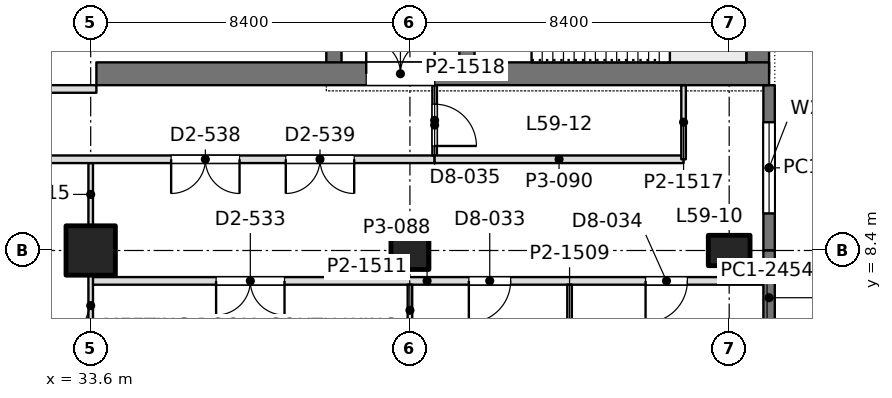
"""IFC4 building model, lengths in metres.
Left out: names, types, materials, properties, quantities, classifications, styles, units other than length and angle.
Written with IfcOpenShell. Run it as: python <this file> out.ifc"""

import sys

from ifc_helpers import new_model, si_unit, direction, frame, frame_2d, origin, origin_2d, place, context, subcontext, project, spatial, rectangle, extrude, element, fill, save


model = new_model("IFC4")
c1 = context("Model", 3, precision=1e-05, world=origin(), true_north=direction((0.0, 1.0)))
c2 = subcontext(c1, "Body", "Model", "MODEL_VIEW")
j1 = project(units=[si_unit("LENGTHUNIT", "METRE"), si_unit("PLANEANGLEUNIT", "RADIAN")], contexts=[c1])
p1 = place(None, origin())
s1 = spatial("IfcSite", under=j1, at=p1, CompositionType="ELEMENT")
p2 = place(p1, origin())
s2 = spatial("IfcBuilding", under=s1, at=p2, CompositionType="ELEMENT")
p3 = place(p2, frame((0.0, 0.0, 259.2)))
s3 = spatial("IfcBuildingStorey", under=s2, at=p3, CompositionType="ELEMENT", Elevation=259.2)
p4 = place(p3, frame((33.6, 8.4, 0.0), z_axis=(0.0, 0.0, 1.0), x_axis=(1.0, 0.0, 0.0)))
e1 = element("IfcColumn", 1, at=p4, inside=s3, PredefinedType="COLUMN", context=c2, shape_type="SweptSolid", body=[
    extrude(rectangle(XDim=1.3, YDim=1.3, at=origin_2d()), origin(), (0.0, 0.0, 1.0), 4.5),
])
p5 = place(p3, frame((42.0, 8.4, 0.0), z_axis=(0.0, 0.0, 1.0), x_axis=(1.0, 0.0, 0.0)))
e2 = element("IfcColumn", 2, at=p5, inside=s3, PredefinedType="COLUMN", context=c2, shape_type="SweptSolid", body=[
    extrude(rectangle(XDim=1.0, YDim=1.0, at=origin_2d()), origin(), (0.0, 0.0, 1.0), 4.5),
])
p6 = place(p3, frame((50.4, 8.4, 0.0), z_axis=(0.0, 0.0, 1.0), x_axis=(0.0, 1.0, 0.0)))
e3 = element("IfcColumn", 3, at=p6, inside=s3, PredefinedType="COLUMN", context=c2, shape_type="SweptSolid", body=[
    extrude(rectangle(XDim=0.8, YDim=1.1, at=origin_2d()), origin(), (0.0, 0.0, 1.0), 4.5),
])
p7 = place(p3, frame((33.75, 13.05, 0.0), z_axis=(0.0, 0.0, 1.0), x_axis=(1.0, 0.0, 0.0)))
e4 = element("IfcWall", 4, at=p7, inside=s3, PredefinedType="SHEAR", context=c2, shape_type="SweptSolid", body=[
    extrude(rectangle(XDim=17.7, YDim=0.6, at=frame_2d((8.85, 0.0))), origin(), (0.0, 0.0, 1.0), 4.5),
])
p8 = place(p7, frame((7.1, 0.0, 0.0)))
e5 = element("IfcOpeningElement", 5, at=p8, cuts=e4, PredefinedType="OPENING", context=c2, shape_type="SweptSolid", body=[
    extrude(rectangle(XDim=1.8, YDim=2.4, at=frame_2d((0.9, 1.2))), frame((0.0, 0.31, 0.0), z_axis=(0.0, -1.0, 0.0), x_axis=(1.0, 0.0, 0.0)), (0.0, 0.0, 1.0), 0.62),
])
p9 = place(p3, frame((51.15, 13.05, 0.0), z_axis=(0.0, 0.0, 1.0), x_axis=(0.0, 1.0, 0.0)))
e6 = element("IfcWall", 6, at=p9, inside=s3, PredefinedType="SHEAR", context=c2, shape_type="SweptSolid", body=[
    extrude(rectangle(XDim=24.3, YDim=0.6, at=frame_2d((12.15, 0.0))), origin(), (0.0, 0.0, 1.0), 4.5),
])
p10 = place(p3, frame((43.5, 13.05, 0.0), z_axis=(0.0, 0.0, 1.0), x_axis=(0.0, 1.0, 0.0)))
e7 = element("IfcWall", 7, at=p10, inside=s3, PredefinedType="SHEAR", context=c2, shape_type="SweptSolid", body=[
    extrude(rectangle(XDim=24.3, YDim=0.4, at=frame_2d((12.15, 0.0))), origin(), (0.0, 0.0, 1.0), 4.5),
])
p11 = place(p10, frame((1.3, 0.0, 0.0)))
e8 = element("IfcOpeningElement", 8, at=p11, cuts=e7, PredefinedType="OPENING", context=c2, shape_type="SweptSolid", body=[
    extrude(rectangle(XDim=1.0, YDim=2.2, at=frame_2d((0.5, 1.1))), frame((0.0, 0.21, 0.0), z_axis=(0.0, -1.0, 0.0), x_axis=(1.0, 0.0, 0.0)), (0.0, 0.0, 1.0), 0.42),
])
p12 = place(p10, frame((22.0, 0.0, 0.0)))
e9 = element("IfcOpeningElement", 9, at=p12, cuts=e7, PredefinedType="OPENING", context=c2, shape_type="SweptSolid", body=[
    extrude(rectangle(XDim=1.0, YDim=2.2, at=frame_2d((0.5, 1.1))), frame((0.0, 0.21, 0.0), z_axis=(0.0, -1.0, 0.0), x_axis=(1.0, 0.0, 0.0)), (0.0, 0.0, 1.0), 0.42),
])
p13 = place(p10, frame((5.55, 0.0, 0.0)))
e10 = element("IfcOpeningElement", 10, at=p13, cuts=e7, PredefinedType="OPENING", context=c2, shape_type="SweptSolid", body=[
    extrude(rectangle(XDim=1.0, YDim=2.2, at=frame_2d((0.5, 1.1))), frame((0.0, 0.21, 0.0), z_axis=(0.0, -1.0, 0.0), x_axis=(1.0, 0.0, 0.0)), (0.0, 0.0, 1.0), 0.42),
])
p14 = place(p10, frame((9.55, 0.0, 0.0)))
e11 = element("IfcOpeningElement", 11, at=p14, cuts=e7, PredefinedType="OPENING", context=c2, shape_type="SweptSolid", body=[
    extrude(rectangle(XDim=1.0, YDim=2.2, at=frame_2d((0.5, 1.1))), frame((0.0, 0.21, 0.0), z_axis=(0.0, -1.0, 0.0), x_axis=(1.0, 0.0, 0.0)), (0.0, 0.0, 1.0), 0.42),
])
p15 = place(p10, frame((12.8, 0.0, 0.0)))
e12 = element("IfcOpeningElement", 12, at=p15, cuts=e7, PredefinedType="OPENING", context=c2, shape_type="SweptSolid", body=[
    extrude(rectangle(XDim=1.1, YDim=2.2, at=frame_2d((0.55, 1.1))), frame((0.0, 0.21, 0.0), z_axis=(0.0, -1.0, 0.0), x_axis=(1.0, 0.0, 0.0)), (0.0, 0.0, 1.0), 0.42),
])
p16 = place(p10, frame((15.538, 0.0, 0.0)))
e13 = element("IfcOpeningElement", 13, at=p16, cuts=e7, PredefinedType="OPENING", context=c2, shape_type="SweptSolid", body=[
    extrude(rectangle(XDim=1.1, YDim=2.2, at=frame_2d((0.55, 1.1))), frame((0.0, 0.21, 0.0), z_axis=(0.0, -1.0, 0.0), x_axis=(1.0, 0.0, 0.0)), (0.0, 0.0, 1.0), 0.42),
])
p17 = place(p10, frame((18.262, 0.0, 0.0)))
e14 = element("IfcOpeningElement", 14, at=p17, cuts=e7, PredefinedType="OPENING", context=c2, shape_type="SweptSolid", body=[
    extrude(rectangle(XDim=1.1, YDim=2.2, at=frame_2d((0.55, 1.1))), frame((0.0, 0.21, 0.0), z_axis=(0.0, -1.0, 0.0), x_axis=(1.0, 0.0, 0.0)), (0.0, 0.0, 1.0), 0.42),
])
p18 = place(p3, frame((40.0, 13.05, 0.0), z_axis=(0.0, 0.0, 1.0), x_axis=(0.0, 1.0, 0.0)))
e15 = element("IfcWall", 15, at=p18, inside=s3, PredefinedType="SHEAR", context=c2, shape_type="SweptSolid", body=[
    extrude(rectangle(XDim=24.3, YDim=0.4, at=frame_2d((12.15, 0.0))), origin(), (0.0, 0.0, 1.0), 4.5),
])
p19 = place(p18, frame((15.75, 0.0, 0.0)))
e16 = element("IfcOpeningElement", 16, at=p19, cuts=e15, PredefinedType="OPENING", context=c2, shape_type="SweptSolid", body=[
    extrude(rectangle(XDim=1.1, YDim=2.2, at=frame_2d((0.55, 1.1))), frame((0.0, 0.21, 0.0), z_axis=(0.0, -1.0, 0.0), x_axis=(1.0, 0.0, 0.0)), (0.0, 0.0, 1.0), 0.42),
])
p20 = place(p18, frame((18.6, 0.0, 0.0)))
e17 = element("IfcOpeningElement", 17, at=p20, cuts=e15, PredefinedType="OPENING", context=c2, shape_type="SweptSolid", body=[
    extrude(rectangle(XDim=1.1, YDim=2.2, at=frame_2d((0.55, 1.1))), frame((0.0, 0.21, 0.0), z_axis=(0.0, -1.0, 0.0), x_axis=(1.0, 0.0, 0.0)), (0.0, 0.0, 1.0), 0.42),
])
p21 = place(p18, frame((21.45, 0.0, 0.0)))
e18 = element("IfcOpeningElement", 18, at=p21, cuts=e15, PredefinedType="OPENING", context=c2, shape_type="SweptSolid", body=[
    extrude(rectangle(XDim=1.1, YDim=2.2, at=frame_2d((0.55, 1.1))), frame((0.0, 0.21, 0.0), z_axis=(0.0, -1.0, 0.0), x_axis=(1.0, 0.0, 0.0)), (0.0, 0.0, 1.0), 0.42),
])
p22 = place(p18, frame((8.65, 0.0, 0.0)))
e19 = element("IfcOpeningElement", 19, at=p22, cuts=e15, PredefinedType="OPENING", context=c2, shape_type="SweptSolid", body=[
    extrude(rectangle(XDim=1.8, YDim=2.4, at=frame_2d((0.9, 1.2))), frame((0.0, 0.21, 0.0), z_axis=(0.0, -1.0, 0.0), x_axis=(1.0, 0.0, 0.0)), (0.0, 0.0, 1.0), 0.42),
])
p23 = place(p3, frame((51.45, 12.75, 0.0), z_axis=(0.0, 0.0, 1.0), x_axis=(0.0, -1.0, 0.0)))
e20 = element("IfcWall", 20, at=p23, inside=s3, PredefinedType="SOLIDWALL", context=c2, shape_type="SweptSolid", body=[
    extrude(rectangle(XDim=4.35, YDim=0.3, at=frame_2d((2.175, 0.0))), origin(), (0.0, 0.0, 1.0), 4.35),
])
p24 = place(p23, frame((0.975, 0.0, 0.9)))
e21 = element("IfcOpeningElement", 21, at=p24, cuts=e20, PredefinedType="OPENING", context=c2, shape_type="SweptSolid", body=[
    extrude(rectangle(XDim=2.4, YDim=1.9, at=frame_2d((1.2, 0.95))), frame((0.0, 0.16, 0.0), z_axis=(0.0, -1.0, 0.0), x_axis=(1.0, 0.0, 0.0)), (0.0, 0.0, 1.0), 0.32),
])
p25 = place(p3, frame((51.45, 8.4, 0.0), z_axis=(0.0, 0.0, 1.0), x_axis=(0.0, -1.0, 0.0)))
e22 = element("IfcWall", 22, at=p25, inside=s3, PredefinedType="SOLIDWALL", context=c2, shape_type="SweptSolid", body=[
    extrude(rectangle(XDim=2.485, YDim=0.3, at=frame_2d((1.243, 0.0))), origin(), (0.0, 0.0, 1.0), 4.35),
])
p26 = place(p3, frame((33.6, 7.6, 0.0), z_axis=(0.0, 0.0, 1.0), x_axis=(1.0, 0.0, 0.0)))
e23 = element("IfcWall", 23, at=p26, inside=s3, PredefinedType="PARTITIONING", context=c2, shape_type="SweptSolid", body=[
    extrude(rectangle(XDim=17.702, YDim=0.2, at=frame_2d((8.851, 0.0))), origin(), (0.0, 0.0, 1.0), 3.86),
])
p27 = place(p26, frame((3.3, 0.0, 0.0)))
e24 = element("IfcOpeningElement", 24, at=p27, cuts=e23, PredefinedType="OPENING", context=c2, shape_type="SweptSolid", body=[
    extrude(rectangle(XDim=1.8, YDim=2.2, at=frame_2d((0.9, 1.1))), frame((0.0, 0.11, 0.0), z_axis=(0.0, -1.0, 0.0), x_axis=(1.0, 0.0, 0.0)), (0.0, 0.0, 1.0), 0.22),
])
p28 = place(p26, frame((9.95, 0.0, 0.0)))
e25 = element("IfcOpeningElement", 25, at=p28, cuts=e23, PredefinedType="OPENING", context=c2, shape_type="SweptSolid", body=[
    extrude(rectangle(XDim=1.1, YDim=2.4, at=frame_2d((0.55, 1.2))), frame((0.0, 0.11, 0.0), z_axis=(0.0, -1.0, 0.0), x_axis=(1.0, 0.0, 0.0)), (0.0, 0.0, 1.0), 0.22),
])
p29 = place(p26, frame((14.6, 0.0, 0.0)))
e26 = element("IfcOpeningElement", 26, at=p29, cuts=e23, PredefinedType="OPENING", context=c2, shape_type="SweptSolid", body=[
    extrude(rectangle(XDim=1.1, YDim=2.4, at=frame_2d((0.55, 1.2))), frame((0.0, 0.11, 0.0), z_axis=(0.0, -1.0, 0.0), x_axis=(1.0, 0.0, 0.0)), (0.0, 0.0, 1.0), 0.22),
])
p30 = place(p3, frame((33.6, 6.149, 0.0), z_axis=(0.0, 0.0, 1.0), x_axis=(0.0, 1.0, 0.0)))
e27 = element("IfcWall", 27, at=p30, inside=s3, PredefinedType="PARTITIONING", context=c2, shape_type="SweptSolid", body=[
    extrude(rectangle(XDim=1.603, YDim=0.12, at=frame_2d((0.802, 0.0))), origin(), (0.0, 0.0, 1.0), 3.99),
])
p31 = place(p3, frame((42.0, 6.149, 0.0), z_axis=(0.0, 0.0, 1.0), x_axis=(0.0, 1.0, 0.0)))
e28 = element("IfcWall", 28, at=p31, inside=s3, PredefinedType="PARTITIONING", context=c2, shape_type="SweptSolid", body=[
    extrude(rectangle(XDim=1.353, YDim=0.12, at=frame_2d((0.677, 0.0))), origin(), (0.0, 0.0, 1.0), 3.99),
])
p32 = place(p3, frame((46.2, 4.7, 0.0), z_axis=(0.0, 0.0, 1.0), x_axis=(0.0, 1.0, 0.0)))
e29 = element("IfcWall", 29, at=p32, inside=s3, PredefinedType="PARTITIONING", context=c2, shape_type="SweptSolid", body=[
    extrude(rectangle(XDim=2.802, YDim=0.12, at=frame_2d((1.401, 0.0))), origin(), (0.0, 0.0, 1.0), 3.86),
])
p33 = place(p3, frame((33.6, 9.049, 0.0), z_axis=(0.0, 0.0, 1.0), x_axis=(0.0, 1.0, 0.0)))
e30 = element("IfcWall", 30, at=p33, inside=s3, PredefinedType="PARTITIONING", context=c2, shape_type="SweptSolid", body=[
    extrude(rectangle(XDim=1.653, YDim=0.12, at=frame_2d((0.826, 0.0))), origin(), (0.0, 0.0, 1.0), 3.99),
])
p34 = place(p3, frame((1.2, 10.8, 0.0), z_axis=(0.0, 0.0, 1.0), x_axis=(1.0, 0.0, 0.0)))
e31 = element("IfcWall", 31, at=p34, inside=s3, PredefinedType="PARTITIONING", context=c2, shape_type="SweptSolid", body=[
    extrude(rectangle(XDim=41.452, YDim=0.2, at=frame_2d((20.726, 0.0))), origin(), (0.0, 0.0, 1.0), 3.8),
])
p35 = place(p34, frame((4.3, 0.0, 0.0)))
e32 = element("IfcOpeningElement", 32, at=p35, cuts=e31, PredefinedType="OPENING", context=c2, shape_type="SweptSolid", body=[
    extrude(rectangle(XDim=1.8, YDim=2.2, at=frame_2d((0.9, 1.1))), frame((0.0, 0.11, 0.0), z_axis=(0.0, -1.0, 0.0), x_axis=(1.0, 0.0, 0.0)), (0.0, 0.0, 1.0), 0.22),
])
p36 = place(p34, frame((9.5, 0.0, 0.0)))
e33 = element("IfcOpeningElement", 33, at=p36, cuts=e31, PredefinedType="OPENING", context=c2, shape_type="SweptSolid", body=[
    extrude(rectangle(XDim=1.8, YDim=2.2, at=frame_2d((0.9, 1.1))), frame((0.0, 0.11, 0.0), z_axis=(0.0, -1.0, 0.0), x_axis=(1.0, 0.0, 0.0)), (0.0, 0.0, 1.0), 0.22),
])
p37 = place(p34, frame((20.3, 0.0, 0.0)))
e34 = element("IfcOpeningElement", 34, at=p37, cuts=e31, PredefinedType="OPENING", context=c2, shape_type="SweptSolid", body=[
    extrude(rectangle(XDim=1.8, YDim=2.2, at=frame_2d((0.9, 1.1))), frame((0.0, 0.11, 0.0), z_axis=(0.0, -1.0, 0.0), x_axis=(1.0, 0.0, 0.0)), (0.0, 0.0, 1.0), 0.22),
])
p38 = place(p34, frame((25.9, 0.0, 0.0)))
e35 = element("IfcOpeningElement", 35, at=p38, cuts=e31, PredefinedType="OPENING", context=c2, shape_type="SweptSolid", body=[
    extrude(rectangle(XDim=1.8, YDim=2.2, at=frame_2d((0.9, 1.1))), frame((0.0, 0.11, 0.0), z_axis=(0.0, -1.0, 0.0), x_axis=(1.0, 0.0, 0.0)), (0.0, 0.0, 1.0), 0.22),
])
p39 = place(p34, frame((34.517, 0.0, 0.0)))
e36 = element("IfcOpeningElement", 36, at=p39, cuts=e31, PredefinedType="OPENING", context=c2, shape_type="SweptSolid", body=[
    extrude(rectangle(XDim=1.8, YDim=2.2, at=frame_2d((0.9, 1.1))), frame((0.0, 0.11, 0.0), z_axis=(0.0, -1.0, 0.0), x_axis=(1.0, 0.0, 0.0)), (0.0, 0.0, 1.0), 0.22),
])
p40 = place(p34, frame((37.533, 0.0, 0.0)))
e37 = element("IfcOpeningElement", 37, at=p40, cuts=e31, PredefinedType="OPENING", context=c2, shape_type="SweptSolid", body=[
    extrude(rectangle(XDim=1.8, YDim=2.2, at=frame_2d((0.9, 1.1))), frame((0.0, 0.11, 0.0), z_axis=(0.0, -1.0, 0.0), x_axis=(1.0, 0.0, 0.0)), (0.0, 0.0, 1.0), 0.22),
])
p41 = place(p3, frame((42.65, 10.898, 0.0), z_axis=(0.0, 0.0, 1.0), x_axis=(0.0, 1.0, 0.0)))
e38 = element("IfcWall", 38, at=p41, inside=s3, PredefinedType="PARTITIONING", context=c2, shape_type="SweptSolid", body=[
    extrude(rectangle(XDim=1.854, YDim=0.12, at=frame_2d((0.927, 0.0))), origin(), (0.0, 0.0, 1.0), 4.35),
])
p42 = place(p41, frame((0.252, 0.0, 0.0)))
e39 = element("IfcOpeningElement", 39, at=p42, cuts=e38, PredefinedType="OPENING", context=c2, shape_type="SweptSolid", body=[
    extrude(rectangle(XDim=1.1, YDim=2.4, at=frame_2d((0.55, 1.2))), frame((0.0, 0.07, 0.0), z_axis=(0.0, -1.0, 0.0), x_axis=(1.0, 0.0, 0.0)), (0.0, 0.0, 1.0), 0.14),
])
p43 = place(p3, frame((42.648, 10.8, 0.0), z_axis=(0.0, 0.0, 1.0), x_axis=(1.0, 0.0, 0.0)))
e40 = element("IfcWall", 40, at=p43, inside=s3, PredefinedType="PARTITIONING", context=c2, shape_type="SweptSolid", body=[
    extrude(rectangle(XDim=6.552, YDim=0.2, at=frame_2d((3.276, 0.0))), origin(), (0.0, 0.0, 1.0), 4.35),
])
p44 = place(p3, frame((49.2, 10.8, 0.0), z_axis=(0.0, 0.0, 1.0), x_axis=(0.0, 1.0, 0.0)))
e41 = element("IfcWall", 41, at=p44, inside=s3, PredefinedType="PARTITIONING", context=c2, shape_type="SweptSolid", body=[
    extrude(rectangle(XDim=1.952, YDim=0.12, at=frame_2d((0.976, 0.0))), origin(), (0.0, 0.0, 1.0), 4.35),
])
p45 = place(p3, frame((16.65, 12.65, 0.0), z_axis=(0.0, 0.0, 1.0), x_axis=(1.0, 0.0, 0.0)))
e42 = element("IfcWall", 42, at=p45, inside=s3, PredefinedType="PARTITIONING", context=c2, shape_type="SweptSolid", body=[
    extrude(rectangle(XDim=17.1, YDim=0.2, at=frame_2d((8.55, 0.0))), origin(), (0.0, 0.0, 1.0), 3.8),
])
p46 = place(p45, frame((3.8, 0.0, 0.0)))
e43 = element("IfcOpeningElement", 43, at=p46, cuts=e42, PredefinedType="OPENING", context=c2, shape_type="SweptSolid", body=[
    extrude(rectangle(XDim=1.1, YDim=2.4, at=frame_2d((0.55, 1.2))), frame((0.0, 0.11, 0.0), z_axis=(0.0, -1.0, 0.0), x_axis=(1.0, 0.0, 0.0)), (0.0, 0.0, 1.0), 0.22),
])
p47 = place(p45, frame((12.2, 0.0, 0.0)))
e44 = element("IfcOpeningElement", 44, at=p47, cuts=e42, PredefinedType="OPENING", context=c2, shape_type="SweptSolid", body=[
    extrude(rectangle(XDim=1.1, YDim=2.4, at=frame_2d((0.55, 1.2))), frame((0.0, 0.11, 0.0), z_axis=(0.0, -1.0, 0.0), x_axis=(1.0, 0.0, 0.0)), (0.0, 0.0, 1.0), 0.22),
])
p48 = place(p24, origin())
e45 = element("IfcWindow", 45, at=p48, inside=s3, PartitioningType="SINGLE_PANEL", PredefinedType="WINDOW", context=c2, shape_type="SweptSolid", body=[
    extrude(rectangle(XDim=2.4, YDim=1.9, at=frame_2d((1.2, 0.95))), frame((0.0, 0.03, 0.0), z_axis=(0.0, -1.0, 0.0), x_axis=(1.0, 0.0, 0.0)), (0.0, 0.0, 1.0), 0.06),
])
fill(e21, e45)
p49 = place(p8, origin())
e46 = element("IfcDoor", 46, at=p49, inside=s3, OperationType="DOUBLE_DOOR_SINGLE_SWING", PredefinedType="DOOR", context=c2, shape_type="SweptSolid", body=[
    extrude(rectangle(XDim=1.8, YDim=2.4, at=frame_2d((0.9, 1.2))), frame((0.0, 0.025, 0.0), z_axis=(0.0, -1.0, 0.0), x_axis=(1.0, 0.0, 0.0)), (0.0, 0.0, 1.0), 0.05),
])
fill(e5, e46)
p50 = place(p27, frame((1.8, 0.0, 0.0), z_axis=(0.0, 0.0, 1.0), x_axis=(-1.0, 0.0, 0.0)))
e47 = element("IfcDoor", 47, at=p50, inside=s3, OperationType="DOUBLE_DOOR_SINGLE_SWING", PredefinedType="DOOR", context=c2, shape_type="SweptSolid", body=[
    extrude(rectangle(XDim=1.8, YDim=2.2, at=frame_2d((0.9, 1.1))), frame((0.0, 0.025, 0.0), z_axis=(0.0, -1.0, 0.0), x_axis=(1.0, 0.0, 0.0)), (0.0, 0.0, 1.0), 0.05),
])
fill(e24, e47)
p51 = place(p28, frame((1.1, 0.0, 0.0), z_axis=(0.0, 0.0, 1.0), x_axis=(-1.0, 0.0, 0.0)))
e48 = element("IfcDoor", 48, at=p51, inside=s3, OperationType="SINGLE_SWING_RIGHT", PredefinedType="DOOR", context=c2, shape_type="SweptSolid", body=[
    extrude(rectangle(XDim=1.1, YDim=2.4, at=frame_2d((0.55, 1.2))), frame((0.0, 0.025, 0.0), z_axis=(0.0, -1.0, 0.0), x_axis=(1.0, 0.0, 0.0)), (0.0, 0.0, 1.0), 0.05),
])
fill(e25, e48)
p52 = place(p29, frame((1.1, 0.0, 0.0), z_axis=(0.0, 0.0, 1.0), x_axis=(-1.0, 0.0, 0.0)))
e49 = element("IfcDoor", 49, at=p52, inside=s3, OperationType="SINGLE_SWING_RIGHT", PredefinedType="DOOR", context=c2, shape_type="SweptSolid", body=[
    extrude(rectangle(XDim=1.1, YDim=2.4, at=frame_2d((0.55, 1.2))), frame((0.0, 0.025, 0.0), z_axis=(0.0, -1.0, 0.0), x_axis=(1.0, 0.0, 0.0)), (0.0, 0.0, 1.0), 0.05),
])
fill(e26, e49)
p53 = place(p39, frame((1.8, 0.0, 0.0), z_axis=(0.0, 0.0, 1.0), x_axis=(-1.0, 0.0, 0.0)))
e50 = element("IfcDoor", 50, at=p53, inside=s3, OperationType="DOUBLE_DOOR_SINGLE_SWING", PredefinedType="DOOR", context=c2, shape_type="SweptSolid", body=[
    extrude(rectangle(XDim=1.8, YDim=2.2, at=frame_2d((0.9, 1.1))), frame((0.0, 0.025, 0.0), z_axis=(0.0, -1.0, 0.0), x_axis=(1.0, 0.0, 0.0)), (0.0, 0.0, 1.0), 0.05),
])
fill(e36, e50)
p54 = place(p40, frame((1.8, 0.0, 0.0), z_axis=(0.0, 0.0, 1.0), x_axis=(-1.0, 0.0, 0.0)))
e51 = element("IfcDoor", 51, at=p54, inside=s3, OperationType="DOUBLE_DOOR_SINGLE_SWING", PredefinedType="DOOR", context=c2, shape_type="SweptSolid", body=[
    extrude(rectangle(XDim=1.8, YDim=2.2, at=frame_2d((0.9, 1.1))), frame((0.0, 0.025, 0.0), z_axis=(0.0, -1.0, 0.0), x_axis=(1.0, 0.0, 0.0)), (0.0, 0.0, 1.0), 0.05),
])
fill(e37, e51)
p55 = place(p42, frame((1.1, 0.0, 0.0), z_axis=(0.0, 0.0, 1.0), x_axis=(-1.0, 0.0, 0.0)))
e52 = element("IfcDoor", 52, at=p55, inside=s3, OperationType="SINGLE_SWING_RIGHT", PredefinedType="DOOR", context=c2, shape_type="SweptSolid", body=[
    extrude(rectangle(XDim=1.1, YDim=2.4, at=frame_2d((0.55, 1.2))), frame((0.0, 0.025, 0.0), z_axis=(0.0, -1.0, 0.0), x_axis=(1.0, 0.0, 0.0)), (0.0, 0.0, 1.0), 0.05),
])
fill(e39, e52)
save(model, sys.argv[1])
